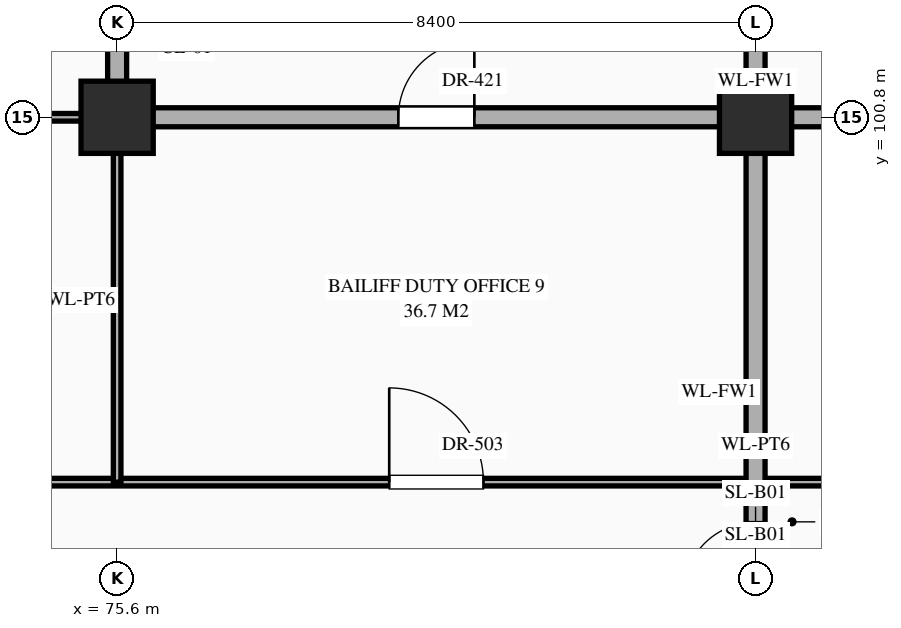
"""IFC4 building model, lengths in metres.
Left out: names, types, materials, properties, quantities, classifications, styles, units other than length and angle.
Written with IfcOpenShell. Run it as: python <this file> out.ifc"""

import sys

from ifc_helpers import new_model, si_unit, direction, frame, frame_2d, origin, origin_2d, place, context, subcontext, project, spatial, rectangle, extrude, element, fill, save


model = new_model("IFC4")
c1 = context("Model", 3, precision=1e-05, world=origin(), true_north=direction((0.0, 1.0)))
c2 = subcontext(c1, "Body", "Model", "MODEL_VIEW")
j1 = project(units=[si_unit("LENGTHUNIT", "METRE"), si_unit("PLANEANGLEUNIT", "RADIAN")], contexts=[c1])
p1 = place(None, origin())
s1 = spatial("IfcSite", under=j1, at=p1, CompositionType="ELEMENT")
p2 = place(p1, origin())
s2 = spatial("IfcBuilding", under=s1, at=p2, CompositionType="ELEMENT")
p3 = place(p2, frame((0.0, 0.0, -5.4)))
s3 = spatial("IfcBuildingStorey", under=s2, at=p3, CompositionType="ELEMENT", Elevation=-5.4)
for number, where, z_axis, x_axis in (
    (1, (75.6, 100.8, 0.0), (0.0, 0.0, 1.0), (1.0, 0.0, 0.0)),
    (2, (84.0, 100.8, 0.0), (0.0, 0.0, 1.0), (1.0, 0.0, 0.0)),
):
    element("IfcColumn", number, at=place(p3, frame(where, z_axis=z_axis, x_axis=x_axis)), inside=s3, PredefinedType="COLUMN", context=c2, shape_type="SweptSolid", body=[
        extrude(rectangle(XDim=0.95, YDim=0.95, at=origin_2d()), origin(), (0.0, 0.0, 1.0), 5.4),
    ])
p4 = place(p3, frame((16.8, 96.0, 0.0), z_axis=(0.0, 0.0, 1.0), x_axis=(1.0, 0.0, 0.0)))
e3 = element("IfcWall", 3, at=p4, inside=s3, PredefinedType="STANDARD", context=c2, shape_type="SweptSolid", body=[
    extrude(rectangle(XDim=134.4, YDim=0.1, at=frame_2d((67.2, 0.0))), origin(), (0.0, 0.0, 1.0), 5.1),
])
p5 = place(p4, frame((3.56, 0.0, 0.0)))
e4 = element("IfcOpeningElement", 4, at=p5, cuts=e3, PredefinedType="OPENING", context=c2, shape_type="SweptSolid", body=[
    extrude(rectangle(XDim=1.28, YDim=2.35, at=frame_2d((0.64, 1.175))), frame((0.0, 0.062, 0.0), z_axis=(0.0, -1.0, 0.0), x_axis=(1.0, 0.0, 0.0)), (0.0, 0.0, 1.0), 0.124),
])
p6 = place(p4, frame((9.63, 0.0, 0.0)))
e5 = element("IfcOpeningElement", 5, at=p6, cuts=e3, PredefinedType="OPENING", context=c2, shape_type="SweptSolid", body=[
    extrude(rectangle(XDim=0.94, YDim=2.3, at=frame_2d((0.47, 1.15))), frame((0.0, 0.062, 0.0), z_axis=(0.0, -1.0, 0.0), x_axis=(1.0, 0.0, 0.0)), (0.0, 0.0, 1.0), 0.124),
])
p7 = place(p4, frame((12.51, 0.0, 0.0)))
e6 = element("IfcOpeningElement", 6, at=p7, cuts=e3, PredefinedType="OPENING", context=c2, shape_type="SweptSolid", body=[
    extrude(rectangle(XDim=0.98, YDim=2.35, at=frame_2d((0.49, 1.175))), frame((0.0, 0.062, 0.0), z_axis=(0.0, -1.0, 0.0), x_axis=(1.0, 0.0, 0.0)), (0.0, 0.0, 1.0), 0.124),
])
p8 = place(p4, frame((14.99, 0.0, 0.0)))
e7 = element("IfcOpeningElement", 7, at=p8, cuts=e3, PredefinedType="OPENING", context=c2, shape_type="SweptSolid", body=[
    extrude(rectangle(XDim=1.02, YDim=2.4, at=frame_2d((0.51, 1.2))), frame((0.0, 0.062, 0.0), z_axis=(0.0, -1.0, 0.0), x_axis=(1.0, 0.0, 0.0)), (0.0, 0.0, 1.0), 0.124),
])
p9 = place(p4, frame((20.47, 0.0, 0.0)))
e8 = element("IfcOpeningElement", 8, at=p9, cuts=e3, PredefinedType="OPENING", context=c2, shape_type="SweptSolid", body=[
    extrude(rectangle(XDim=1.06, YDim=2.4, at=frame_2d((0.53, 1.2))), frame((0.0, 0.062, 0.0), z_axis=(0.0, -1.0, 0.0), x_axis=(1.0, 0.0, 0.0)), (0.0, 0.0, 1.0), 0.124),
])
p10 = place(p4, frame((28.83, 0.0, 0.0)))
e9 = element("IfcOpeningElement", 9, at=p10, cuts=e3, PredefinedType="OPENING", context=c2, shape_type="SweptSolid", body=[
    extrude(rectangle(XDim=1.14, YDim=2.4, at=frame_2d((0.57, 1.2))), frame((0.0, 0.062, 0.0), z_axis=(0.0, -1.0, 0.0), x_axis=(1.0, 0.0, 0.0)), (0.0, 0.0, 1.0), 0.124),
])
p11 = place(p4, frame((34.78, 0.0, 0.0)))
e10 = element("IfcOpeningElement", 10, at=p11, cuts=e3, PredefinedType="OPENING", context=c2, shape_type="SweptSolid", body=[
    extrude(rectangle(XDim=1.04, YDim=2.2, at=frame_2d((0.52, 1.1))), frame((0.0, 0.062, 0.0), z_axis=(0.0, -1.0, 0.0), x_axis=(1.0, 0.0, 0.0)), (0.0, 0.0, 1.0), 0.124),
])
p12 = place(p4, frame((37.66, 0.0, 0.0)))
e11 = element("IfcOpeningElement", 11, at=p12, cuts=e3, PredefinedType="OPENING", context=c2, shape_type="SweptSolid", body=[
    extrude(rectangle(XDim=1.08, YDim=2.25, at=frame_2d((0.54, 1.125))), frame((0.0, 0.062, 0.0), z_axis=(0.0, -1.0, 0.0), x_axis=(1.0, 0.0, 0.0)), (0.0, 0.0, 1.0), 0.124),
])
p13 = place(p4, frame((40.14, 0.0, 0.0)))
e12 = element("IfcOpeningElement", 12, at=p13, cuts=e3, PredefinedType="OPENING", context=c2, shape_type="SweptSolid", body=[
    extrude(rectangle(XDim=1.12, YDim=2.25, at=frame_2d((0.56, 1.125))), frame((0.0, 0.062, 0.0), z_axis=(0.0, -1.0, 0.0), x_axis=(1.0, 0.0, 0.0)), (0.0, 0.0, 1.0), 0.124),
])
p14 = place(p4, frame((45.62, 0.0, 0.0)))
e13 = element("IfcOpeningElement", 13, at=p14, cuts=e3, PredefinedType="OPENING", context=c2, shape_type="SweptSolid", body=[
    extrude(rectangle(XDim=1.16, YDim=2.3, at=frame_2d((0.58, 1.15))), frame((0.0, 0.062, 0.0), z_axis=(0.0, -1.0, 0.0), x_axis=(1.0, 0.0, 0.0)), (0.0, 0.0, 1.0), 0.124),
])
p15 = place(p4, frame((54.0, 0.0, 0.0)))
e14 = element("IfcOpeningElement", 14, at=p15, cuts=e3, PredefinedType="OPENING", context=c2, shape_type="SweptSolid", body=[
    extrude(rectangle(XDim=1.2, YDim=2.35, at=frame_2d((0.6, 1.175))), frame((0.0, 0.062, 0.0), z_axis=(0.0, -1.0, 0.0), x_axis=(1.0, 0.0, 0.0)), (0.0, 0.0, 1.0), 0.124),
])
p16 = place(p4, frame((62.38, 0.0, 0.0)))
e15 = element("IfcOpeningElement", 15, at=p16, cuts=e3, PredefinedType="OPENING", context=c2, shape_type="SweptSolid", body=[
    extrude(rectangle(XDim=1.24, YDim=2.3, at=frame_2d((0.62, 1.15))), frame((0.0, 0.062, 0.0), z_axis=(0.0, -1.0, 0.0), x_axis=(1.0, 0.0, 0.0)), (0.0, 0.0, 1.0), 0.124),
])
p17 = place(p4, frame((68.37, 0.0, 0.0)))
e16 = element("IfcOpeningElement", 16, at=p17, cuts=e3, PredefinedType="OPENING", context=c2, shape_type="SweptSolid", body=[
    extrude(rectangle(XDim=1.06, YDim=2.4, at=frame_2d((0.53, 1.2))), frame((0.0, 0.062, 0.0), z_axis=(0.0, -1.0, 0.0), x_axis=(1.0, 0.0, 0.0)), (0.0, 0.0, 1.0), 0.124),
])
p18 = place(p4, frame((71.23, 0.0, 0.0)))
e17 = element("IfcOpeningElement", 17, at=p18, cuts=e3, PredefinedType="OPENING", context=c2, shape_type="SweptSolid", body=[
    extrude(rectangle(XDim=1.14, YDim=2.4, at=frame_2d((0.57, 1.2))), frame((0.0, 0.062, 0.0), z_axis=(0.0, -1.0, 0.0), x_axis=(1.0, 0.0, 0.0)), (0.0, 0.0, 1.0), 0.124),
])
p19 = place(p4, frame((73.85, 0.0, 0.0)))
e18 = element("IfcOpeningElement", 18, at=p19, cuts=e3, PredefinedType="OPENING", context=c2, shape_type="SweptSolid", body=[
    extrude(rectangle(XDim=0.9, YDim=2.15, at=frame_2d((0.45, 1.075))), frame((0.0, 0.062, 0.0), z_axis=(0.0, -1.0, 0.0), x_axis=(1.0, 0.0, 0.0)), (0.0, 0.0, 1.0), 0.124),
])
p20 = place(p4, frame((79.37, 0.0, 0.0)))
e19 = element("IfcOpeningElement", 19, at=p20, cuts=e3, PredefinedType="OPENING", context=c2, shape_type="SweptSolid", body=[
    extrude(rectangle(XDim=0.86, YDim=2.1, at=frame_2d((0.43, 1.05))), frame((0.0, 0.062, 0.0), z_axis=(0.0, -1.0, 0.0), x_axis=(1.0, 0.0, 0.0)), (0.0, 0.0, 1.0), 0.124),
])
p21 = place(p4, frame((87.74, 0.0, 0.0)))
e20 = element("IfcOpeningElement", 20, at=p21, cuts=e3, PredefinedType="OPENING", context=c2, shape_type="SweptSolid", body=[
    extrude(rectangle(XDim=0.92, YDim=2.15, at=frame_2d((0.46, 1.075))), frame((0.0, 0.062, 0.0), z_axis=(0.0, -1.0, 0.0), x_axis=(1.0, 0.0, 0.0)), (0.0, 0.0, 1.0), 0.124),
])
p22 = place(p4, frame((93.62, 0.0, 0.0)))
e21 = element("IfcOpeningElement", 21, at=p22, cuts=e3, PredefinedType="OPENING", context=c2, shape_type="SweptSolid", body=[
    extrude(rectangle(XDim=0.96, YDim=2.2, at=frame_2d((0.48, 1.1))), frame((0.0, 0.062, 0.0), z_axis=(0.0, -1.0, 0.0), x_axis=(1.0, 0.0, 0.0)), (0.0, 0.0, 1.0), 0.124),
])
p23 = place(p4, frame((96.5, 0.0, 0.0)))
e22 = element("IfcOpeningElement", 22, at=p23, cuts=e3, PredefinedType="OPENING", context=c2, shape_type="SweptSolid", body=[
    extrude(rectangle(XDim=1.0, YDim=2.25, at=frame_2d((0.5, 1.125))), frame((0.0, 0.062, 0.0), z_axis=(0.0, -1.0, 0.0), x_axis=(1.0, 0.0, 0.0)), (0.0, 0.0, 1.0), 0.124),
])
p24 = place(p4, frame((98.98, 0.0, 0.0)))
e23 = element("IfcOpeningElement", 23, at=p24, cuts=e3, PredefinedType="OPENING", context=c2, shape_type="SweptSolid", body=[
    extrude(rectangle(XDim=1.04, YDim=2.2, at=frame_2d((0.52, 1.1))), frame((0.0, 0.062, 0.0), z_axis=(0.0, -1.0, 0.0), x_axis=(1.0, 0.0, 0.0)), (0.0, 0.0, 1.0), 0.124),
])
p25 = place(p4, frame((104.53, 0.0, 0.0)))
e24 = element("IfcOpeningElement", 24, at=p25, cuts=e3, PredefinedType="OPENING", context=c2, shape_type="SweptSolid", body=[
    extrude(rectangle(XDim=0.94, YDim=2.3, at=frame_2d((0.47, 1.15))), frame((0.0, 0.062, 0.0), z_axis=(0.0, -1.0, 0.0), x_axis=(1.0, 0.0, 0.0)), (0.0, 0.0, 1.0), 0.124),
])
p26 = place(p4, frame((112.91, 0.0, 0.0)))
e25 = element("IfcOpeningElement", 25, at=p26, cuts=e3, PredefinedType="OPENING", context=c2, shape_type="SweptSolid", body=[
    extrude(rectangle(XDim=0.98, YDim=2.35, at=frame_2d((0.49, 1.175))), frame((0.0, 0.062, 0.0), z_axis=(0.0, -1.0, 0.0), x_axis=(1.0, 0.0, 0.0)), (0.0, 0.0, 1.0), 0.124),
])
p27 = place(p4, frame((118.79, 0.0, 0.0)))
e26 = element("IfcOpeningElement", 26, at=p27, cuts=e3, PredefinedType="OPENING", context=c2, shape_type="SweptSolid", body=[
    extrude(rectangle(XDim=1.02, YDim=2.4, at=frame_2d((0.51, 1.2))), frame((0.0, 0.062, 0.0), z_axis=(0.0, -1.0, 0.0), x_axis=(1.0, 0.0, 0.0)), (0.0, 0.0, 1.0), 0.124),
])
p28 = place(p4, frame((121.67, 0.0, 0.0)))
e27 = element("IfcOpeningElement", 27, at=p28, cuts=e3, PredefinedType="OPENING", context=c2, shape_type="SweptSolid", body=[
    extrude(rectangle(XDim=1.06, YDim=2.4, at=frame_2d((0.53, 1.2))), frame((0.0, 0.062, 0.0), z_axis=(0.0, -1.0, 0.0), x_axis=(1.0, 0.0, 0.0)), (0.0, 0.0, 1.0), 0.124),
])
p29 = place(p4, frame((124.13, 0.0, 0.0)))
e28 = element("IfcOpeningElement", 28, at=p29, cuts=e3, PredefinedType="OPENING", context=c2, shape_type="SweptSolid", body=[
    extrude(rectangle(XDim=1.14, YDim=2.4, at=frame_2d((0.57, 1.2))), frame((0.0, 0.062, 0.0), z_axis=(0.0, -1.0, 0.0), x_axis=(1.0, 0.0, 0.0)), (0.0, 0.0, 1.0), 0.124),
])
p30 = place(p4, frame((129.75, 0.0, 0.0)))
e29 = element("IfcOpeningElement", 29, at=p30, cuts=e3, PredefinedType="OPENING", context=c2, shape_type="SweptSolid", body=[
    extrude(rectangle(XDim=0.9, YDim=2.15, at=frame_2d((0.45, 1.075))), frame((0.0, 0.062, 0.0), z_axis=(0.0, -1.0, 0.0), x_axis=(1.0, 0.0, 0.0)), (0.0, 0.0, 1.0), 0.124),
])
p31 = place(p3, frame((71.4, 100.8, 0.0), z_axis=(0.0, 0.0, 1.0), x_axis=(1.0, 0.0, 0.0)))
e30 = element("IfcWall", 30, at=p31, inside=s3, PredefinedType="STANDARD", context=c2, shape_type="SweptSolid", body=[
    extrude(rectangle(XDim=4.2, YDim=0.1, at=frame_2d((2.1, 0.0))), origin(), (0.0, 0.0, 1.0), 4.25),
])
p32 = place(p31, frame((1.282, 0.0, 0.0)))
e31 = element("IfcOpeningElement", 31, at=p32, cuts=e30, PredefinedType="OPENING", context=c2, shape_type="SweptSolid", body=[
    extrude(rectangle(XDim=1.24, YDim=2.3, at=frame_2d((0.62, 1.15))), frame((0.0, 0.062, 0.0), z_axis=(0.0, -1.0, 0.0), x_axis=(1.0, 0.0, 0.0)), (0.0, 0.0, 1.0), 0.124),
])
p33 = place(p3, frame((75.6, 100.8, 0.0), z_axis=(0.0, 0.0, 1.0), x_axis=(1.0, 0.0, 0.0)))
e32 = element("IfcWall", 32, at=p33, inside=s3, PredefinedType="STANDARD", context=c2, shape_type="SweptSolid", body=[
    extrude(rectangle(XDim=16.8, YDim=0.25, at=frame_2d((8.4, 0.0))), origin(), (0.0, 0.0, 1.0), 4.25),
])
p34 = place(p33, frame((3.7, 0.0, 0.0)))
e33 = element("IfcOpeningElement", 33, at=p34, cuts=e32, PredefinedType="OPENING", context=c2, shape_type="SweptSolid", body=[
    extrude(rectangle(XDim=1.0, YDim=2.2, at=frame_2d((0.5, 1.1))), frame((0.0, 0.137, 0.0), z_axis=(0.0, -1.0, 0.0), x_axis=(1.0, 0.0, 0.0)), (0.0, 0.0, 1.0), 0.274),
])
p35 = place(p33, frame((9.748, 0.0, 0.0)))
e34 = element("IfcOpeningElement", 34, at=p35, cuts=e32, PredefinedType="OPENING", context=c2, shape_type="SweptSolid", body=[
    extrude(rectangle(XDim=1.1, YDim=2.2, at=frame_2d((0.55, 1.1))), frame((0.0, 0.137, 0.0), z_axis=(0.0, -1.0, 0.0), x_axis=(1.0, 0.0, 0.0)), (0.0, 0.0, 1.0), 0.274),
])
p36 = place(p33, frame((12.5, 0.0, 0.0)))
e35 = element("IfcOpeningElement", 35, at=p36, cuts=e32, PredefinedType="OPENING", context=c2, shape_type="SweptSolid", body=[
    extrude(rectangle(XDim=1.0, YDim=2.2, at=frame_2d((0.5, 1.1))), frame((0.0, 0.137, 0.0), z_axis=(0.0, -1.0, 0.0), x_axis=(1.0, 0.0, 0.0)), (0.0, 0.0, 1.0), 0.274),
])
p37 = place(p33, frame((14.827, 0.0, 0.0)))
e36 = element("IfcOpeningElement", 36, at=p37, cuts=e32, PredefinedType="OPENING", context=c2, shape_type="SweptSolid", body=[
    extrude(rectangle(XDim=0.95, YDim=2.15, at=frame_2d((0.475, 1.075))), frame((0.0, 0.137, 0.0), z_axis=(0.0, -1.0, 0.0), x_axis=(1.0, 0.0, 0.0)), (0.0, 0.0, 1.0), 0.274),
])
p38 = place(p3, frame((75.6, 96.0, 0.0), z_axis=(0.0, 0.0, 1.0), x_axis=(0.0, 1.0, 0.0)))
e37 = element("IfcWall", 37, at=p38, inside=s3, PredefinedType="STANDARD", context=c2, shape_type="SweptSolid", body=[
    extrude(rectangle(XDim=4.8, YDim=0.1, at=frame_2d((2.4, 0.0))), origin(), (0.0, 0.0, 1.0), 4.35),
])
p39 = place(p3, frame((75.6, 100.8, 0.0), z_axis=(0.0, 0.0, 1.0), x_axis=(0.0, 1.0, 0.0)))
e38 = element("IfcWall", 38, at=p39, inside=s3, PredefinedType="STANDARD", context=c2, shape_type="SweptSolid", body=[
    extrude(rectangle(XDim=3.6, YDim=0.25, at=frame_2d((1.8, 0.0))), origin(), (0.0, 0.0, 1.0), 4.35),
])
p40 = place(p39, frame((0.897, 0.0, 0.0)))
e39 = element("IfcOpeningElement", 39, at=p40, cuts=e38, PredefinedType="OPENING", context=c2, shape_type="SweptSolid", body=[
    extrude(rectangle(XDim=1.0, YDim=2.2, at=frame_2d((0.5, 1.1))), frame((0.0, 0.137, 0.0), z_axis=(0.0, -1.0, 0.0), x_axis=(1.0, 0.0, 0.0)), (0.0, 0.0, 1.0), 0.274),
])
p41 = place(p3, frame((84.0, 79.2, 0.0), z_axis=(0.0, 0.0, 1.0), x_axis=(0.0, 1.0, 0.0)))
e40 = element("IfcWall", 40, at=p41, inside=s3, PredefinedType="STANDARD", context=c2, shape_type="SweptSolid", body=[
    extrude(rectangle(XDim=35.96, YDim=0.25, at=frame_2d((17.98, 0.0))), origin(), (0.0, 0.0, 1.0), 4.35),
])
p42 = place(p41, frame((22.798, 0.0, 0.0)))
e41 = element("IfcOpeningElement", 41, at=p42, cuts=e40, PredefinedType="OPENING", context=c2, shape_type="SweptSolid", body=[
    extrude(rectangle(XDim=1.6, YDim=2.3, at=frame_2d((0.8, 1.15))), frame((0.0, 0.137, 0.0), z_axis=(0.0, -1.0, 0.0), x_axis=(1.0, 0.0, 0.0)), (0.0, 0.0, 1.0), 0.274),
])
p43 = place(p41, frame((12.528, 0.0, 0.0)))
e42 = element("IfcOpeningElement", 42, at=p43, cuts=e40, PredefinedType="OPENING", context=c2, shape_type="SweptSolid", body=[
    extrude(rectangle(XDim=0.95, YDim=2.15, at=frame_2d((0.475, 1.075))), frame((0.0, 0.137, 0.0), z_axis=(0.0, -1.0, 0.0), x_axis=(1.0, 0.0, 0.0)), (0.0, 0.0, 1.0), 0.274),
])
p44 = place(p41, frame((15.323, 0.0, 0.0)))
e43 = element("IfcOpeningElement", 43, at=p44, cuts=e40, PredefinedType="OPENING", context=c2, shape_type="SweptSolid", body=[
    extrude(rectangle(XDim=0.95, YDim=2.15, at=frame_2d((0.475, 1.075))), frame((0.0, 0.137, 0.0), z_axis=(0.0, -1.0, 0.0), x_axis=(1.0, 0.0, 0.0)), (0.0, 0.0, 1.0), 0.274),
])
p45 = place(p41, frame((25.903, 0.0, 0.0)))
e44 = element("IfcOpeningElement", 44, at=p45, cuts=e40, PredefinedType="OPENING", context=c2, shape_type="SweptSolid", body=[
    extrude(rectangle(XDim=1.8, YDim=2.35, at=frame_2d((0.9, 1.175))), frame((0.0, 0.137, 0.0), z_axis=(0.0, -1.0, 0.0), x_axis=(1.0, 0.0, 0.0)), (0.0, 0.0, 1.0), 0.274),
])
p46 = place(p41, frame((29.722, 0.0, 0.0)))
e45 = element("IfcOpeningElement", 45, at=p46, cuts=e40, PredefinedType="OPENING", context=c2, shape_type="SweptSolid", body=[
    extrude(rectangle(XDim=0.95, YDim=2.15, at=frame_2d((0.475, 1.075))), frame((0.0, 0.137, 0.0), z_axis=(0.0, -1.0, 0.0), x_axis=(1.0, 0.0, 0.0)), (0.0, 0.0, 1.0), 0.274),
])
p47 = place(p41, frame((5.327, 0.0, 0.0)))
e46 = element("IfcOpeningElement", 46, at=p47, cuts=e40, PredefinedType="OPENING", context=c2, shape_type="SweptSolid", body=[
    extrude(rectangle(XDim=0.95, YDim=2.15, at=frame_2d((0.475, 1.075))), frame((0.0, 0.137, 0.0), z_axis=(0.0, -1.0, 0.0), x_axis=(1.0, 0.0, 0.0)), (0.0, 0.0, 1.0), 0.274),
])
p48 = place(p34, origin())
e47 = element("IfcDoor", 47, at=p48, inside=s3, OperationType="SINGLE_SWING_RIGHT", PredefinedType="DOOR", context=c2, shape_type="SweptSolid", body=[
    extrude(rectangle(XDim=1.0, YDim=2.2, at=frame_2d((0.5, 1.1))), frame((0.0, 0.025, 0.0), z_axis=(0.0, -1.0, 0.0), x_axis=(1.0, 0.0, 0.0)), (0.0, 0.0, 1.0), 0.05),
])
fill(e33, e47)
p49 = place(p44, origin())
e48 = element("IfcDoor", 48, at=p49, inside=s3, OperationType="SINGLE_SWING_LEFT", PredefinedType="DOOR", context=c2, shape_type="SweptSolid", body=[
    extrude(rectangle(XDim=0.95, YDim=2.15, at=frame_2d((0.475, 1.075))), frame((0.0, 0.025, 0.0), z_axis=(0.0, -1.0, 0.0), x_axis=(1.0, 0.0, 0.0)), (0.0, 0.0, 1.0), 0.05),
])
fill(e43, e48)
p50 = place(p16, origin())
e49 = element("IfcDoor", 49, at=p50, inside=s3, OperationType="SINGLE_SWING_LEFT", PredefinedType="DOOR", context=c2, shape_type="SweptSolid", body=[
    extrude(rectangle(XDim=1.24, YDim=2.3, at=frame_2d((0.62, 1.15))), frame((0.0, 0.025, 0.0), z_axis=(0.0, -1.0, 0.0), x_axis=(1.0, 0.0, 0.0)), (0.0, 0.0, 1.0), 0.05),
])
fill(e15, e49)
save(model, sys.argv[1])
